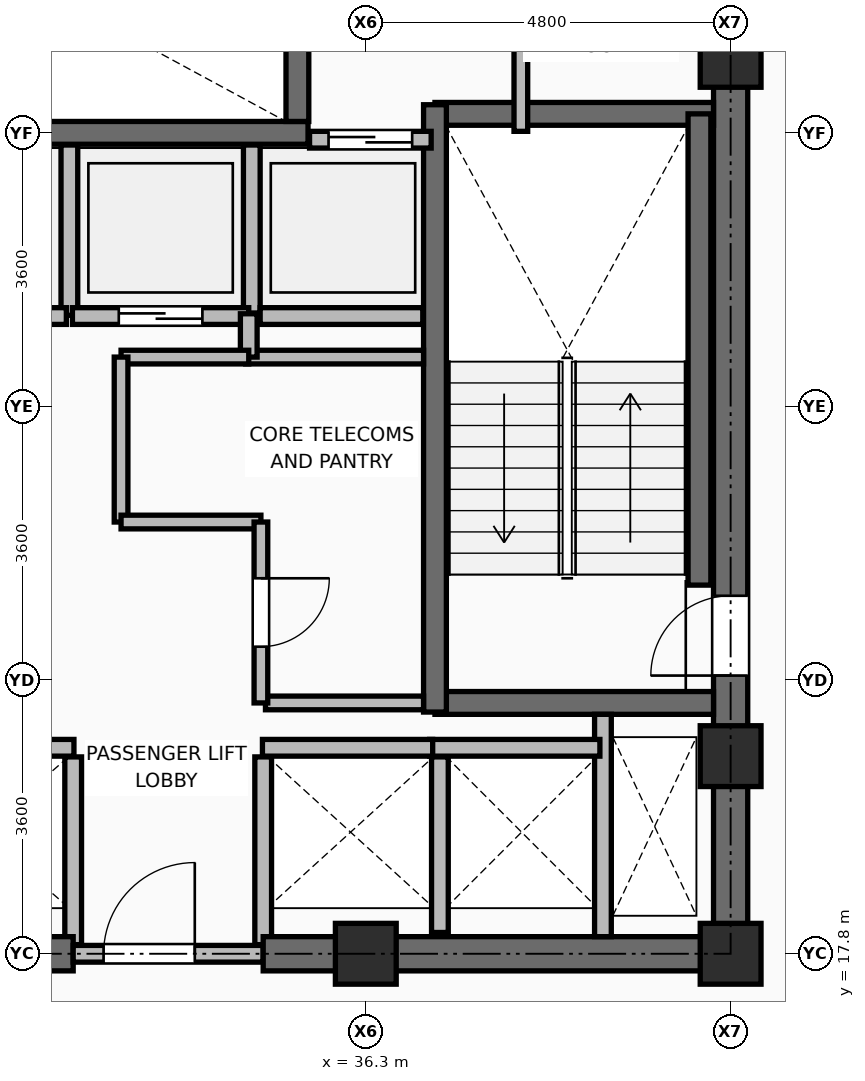
"""IFC4 building model, lengths in metres.
Left out: names, types, materials, properties, quantities, classifications, styles, units other than length and angle.
Written with IfcOpenShell. Run it as: python <this file> out.ifc"""

import sys

from ifc_helpers import new_model, si_unit, direction, frame, frame_2d, origin, origin_2d, place, context, subcontext, project, spatial, rectangle, extrude, element, fill, save


model = new_model("IFC4")
c1 = context("Model", 3, precision=1e-05, world=origin(), true_north=direction((0.0, 1.0)))
c2 = subcontext(c1, "Body", "Model", "MODEL_VIEW")
j1 = project(units=[si_unit("LENGTHUNIT", "METRE"), si_unit("PLANEANGLEUNIT", "RADIAN")], contexts=[c1])
p1 = place(None, origin())
s1 = spatial("IfcSite", under=j1, at=p1, CompositionType="ELEMENT")
p2 = place(p1, origin())
s2 = spatial("IfcBuilding", under=s1, at=p2, CompositionType="ELEMENT")
p3 = place(p2, frame((0.0, 0.0, 242.4)))
s3 = spatial("IfcBuildingStorey", under=s2, at=p3, CompositionType="ELEMENT", Elevation=242.4)
for number, where, z_axis, x_axis in (
    (1, (36.3, 17.8, 0.0), (0.0, 0.0, 1.0), (1.0, 0.0, 0.0)),
    (2, (41.1, 17.8, 0.0), (0.0, 0.0, 1.0), (1.0, 0.0, 0.0)),
    (3, (41.1, 20.4, 0.0), (0.0, 0.0, 1.0), (1.0, 0.0, 0.0)),
    (4, (41.1, 29.6, 0.0), (0.0, 0.0, 1.0), (1.0, 0.0, 0.0)),
):
    element("IfcColumn", number, at=place(p3, frame(where, z_axis=z_axis, x_axis=x_axis)), inside=s3, PredefinedType="COLUMN", context=c2, shape_type="SweptSolid", body=[
        extrude(rectangle(XDim=0.8, YDim=0.8, at=origin_2d()), origin(), (0.0, 0.0, 1.0), 3.75),
    ])
for number, where, z_axis, x_axis in (
    (5, (32.45, 17.92, 0.0), (0.0, 0.0, 1.0), (0.0, 1.0, 0.0)),
    (6, (34.95, 17.92, 0.0), (0.0, 0.0, 1.0), (0.0, 1.0, 0.0)),
):
    element("IfcWall", number, at=place(p3, frame(where, z_axis=z_axis, x_axis=x_axis)), inside=s3, PredefinedType="PARTITIONING", context=c2, shape_type="SweptSolid", body=[
        extrude(rectangle(XDim=2.47, YDim=0.22, at=frame_2d((1.235, 0.0))), origin(), (0.0, 0.0, 1.0), 3.545),
    ])
p4 = place(p3, frame((37.275, 18.08, 0.0), z_axis=(0.0, 0.0, 1.0), x_axis=(0.0, 1.0, 0.0)))
e7 = element("IfcWall", 7, at=p4, inside=s3, PredefinedType="PARTITIONING", context=c2, shape_type="SweptSolid", body=[
    extrude(rectangle(XDim=2.31, YDim=0.22, at=frame_2d((1.155, 0.0))), origin(), (0.0, 0.0, 1.0), 3.545),
])
p5 = place(p3, frame((32.4, 26.2, 0.0), z_axis=(0.0, 0.0, 1.0), x_axis=(0.0, 1.0, 0.0)))
e8 = element("IfcWall", 8, at=p5, inside=s3, PredefinedType="PARTITIONING", context=c2, shape_type="SweptSolid", body=[
    extrude(rectangle(XDim=2.24, YDim=0.22, at=frame_2d((1.12, 0.0))), origin(), (0.0, 0.0, 1.0), 3.545),
])
p6 = place(p3, frame((34.8, 26.23, 0.0), z_axis=(0.0, 0.0, 1.0), x_axis=(0.0, 1.0, 0.0)))
e9 = element("IfcWall", 9, at=p6, inside=s3, PredefinedType="PARTITIONING", context=c2, shape_type="SweptSolid", body=[
    extrude(rectangle(XDim=2.21, YDim=0.22, at=frame_2d((1.105, 0.0))), origin(), (0.0, 0.0, 1.0), 3.545),
])
p7 = place(p3, frame((34.91, 26.19, 0.0), z_axis=(0.0, 0.0, 1.0), x_axis=(1.0, 0.0, 0.0)))
e10 = element("IfcWall", 10, at=p7, inside=s3, PredefinedType="PARTITIONING", context=c2, shape_type="SweptSolid", body=[
    extrude(rectangle(XDim=2.14, YDim=0.22, at=frame_2d((1.07, 0.0))), origin(), (0.0, 0.0, 1.0), 3.545),
])
p8 = place(p3, frame((25.55, 17.8, 0.0), z_axis=(0.0, 0.0, 1.0), x_axis=(1.0, 0.0, 0.0)))
e11 = element("IfcWall", 11, at=p8, inside=s3, PredefinedType="SHEAR", context=c2, shape_type="SweptSolid", body=[
    extrude(rectangle(XDim=6.9, YDim=0.45, at=frame_2d((3.45, 0.0))), origin(), (0.0, 0.0, 1.0), 3.57),
])
p9 = place(p3, frame((32.45, 17.8, 0.0), z_axis=(0.0, 0.0, 1.0), x_axis=(1.0, 0.0, 0.0)))
e12 = element("IfcWall", 12, at=p9, inside=s3, PredefinedType="PARTITIONING", context=c2, shape_type="SweptSolid", body=[
    extrude(rectangle(XDim=2.5, YDim=0.22, at=frame_2d((1.25, 0.0))), origin(), (0.0, 0.0, 1.0), 3.081),
])
p10 = place(p9, frame((0.4, 0.0, 0.0)))
e13 = element("IfcOpeningElement", 13, at=p10, cuts=e12, PredefinedType="OPENING", context=c2, shape_type="SweptSolid", body=[
    extrude(rectangle(XDim=1.2, YDim=2.1, at=frame_2d((0.6, 1.05))), frame((0.0, 0.12, 0.0), z_axis=(0.0, -1.0, 0.0), x_axis=(1.0, 0.0, 0.0)), (0.0, 0.0, 1.0), 0.24),
])
p11 = place(p3, frame((34.95, 17.8, 0.0), z_axis=(0.0, 0.0, 1.0), x_axis=(1.0, 0.0, 0.0)))
e14 = element("IfcWall", 14, at=p11, inside=s3, PredefinedType="SHEAR", context=c2, shape_type="SweptSolid", body=[
    extrude(rectangle(XDim=6.375, YDim=0.45, at=frame_2d((3.188, 0.0))), origin(), (0.0, 0.0, 1.0), 3.57),
])
p12 = place(p3, frame((41.1, 18.025, 0.0), z_axis=(0.0, 0.0, 1.0), x_axis=(0.0, 1.0, 0.0)))
e15 = element("IfcWall", 15, at=p12, inside=s3, PredefinedType="SHEAR", context=c2, shape_type="SweptSolid", body=[
    extrude(rectangle(XDim=14.2, YDim=0.45, at=frame_2d((7.1, 0.0))), origin(), (0.0, 0.0, 1.0), 3.57),
])
p13 = place(p12, frame((3.435, 0.0, 0.0)))
e16 = element("IfcOpeningElement", 16, at=p13, cuts=e15, PredefinedType="OPENING", context=c2, shape_type="SweptSolid", body=[
    extrude(rectangle(XDim=1.05, YDim=2.1, at=frame_2d((0.525, 1.05))), frame((0.0, 0.235, 0.0), z_axis=(0.0, -1.0, 0.0), x_axis=(1.0, 0.0, 0.0)), (0.0, 0.0, 1.0), 0.47),
])
for number, where, z_axis, x_axis in (
    (17, (37.21, 21.1, 0.0), (0.0, 0.0, 1.0), (1.0, 0.0, 0.0)),
    (18, (37.21, 28.85, 0.0), (0.0, 0.0, 1.0), (1.0, 0.0, 0.0)),
):
    element("IfcWall", number, at=place(p3, frame(where, z_axis=z_axis, x_axis=x_axis)), inside=s3, PredefinedType="SHEAR", context=c2, shape_type="SweptSolid", body=[
        extrude(rectangle(XDim=3.665, YDim=0.3, at=frame_2d((1.833, 0.0))), origin(), (0.0, 0.0, 1.0), 3.57),
    ])
p14 = place(p3, frame((37.21, 20.98, 0.0), z_axis=(0.0, 0.0, 1.0), x_axis=(0.0, 1.0, 0.0)))
e19 = element("IfcWall", 19, at=p14, inside=s3, PredefinedType="SHEAR", context=c2, shape_type="SweptSolid", body=[
    extrude(rectangle(XDim=7.99, YDim=0.3, at=frame_2d((3.995, 0.0))), origin(), (0.0, 0.0, 1.0), 3.57),
])
p15 = place(p3, frame((40.69, 22.65, 0.0), z_axis=(0.0, 0.0, 1.0), x_axis=(0.0, 1.0, 0.0)))
e20 = element("IfcWall", 20, at=p15, inside=s3, PredefinedType="SHEAR", context=c2, shape_type="SweptSolid", body=[
    extrude(rectangle(XDim=6.2, YDim=0.3, at=frame_2d((3.1, 0.0))), origin(), (0.0, 0.0, 1.0), 3.57),
])
p16 = place(p3, frame((27.51, 28.6, 0.0), z_axis=(0.0, 0.0, 1.0), x_axis=(1.0, 0.0, 0.0)))
e21 = element("IfcWall", 21, at=p16, inside=s3, PredefinedType="SHEAR", context=c2, shape_type="SweptSolid", body=[
    extrude(rectangle(XDim=8.03, YDim=0.3, at=frame_2d((4.015, 0.0))), origin(), (0.0, 0.0, 1.0), 3.57),
])
p17 = place(p3, frame((35.4, 28.75, 0.0), z_axis=(0.0, 0.0, 1.0), x_axis=(0.0, 1.0, 0.0)))
e22 = element("IfcWall", 22, at=p17, inside=s3, PredefinedType="SHEAR", context=c2, shape_type="SweptSolid", body=[
    extrude(rectangle(XDim=3.475, YDim=0.3, at=frame_2d((1.738, 0.0))), origin(), (0.0, 0.0, 1.0), 3.57),
])
p18 = place(p3, frame((39.42, 18.025, 0.0), z_axis=(0.0, 0.0, 1.0), x_axis=(0.0, 1.0, 0.0)))
e23 = element("IfcWall", 23, at=p18, inside=s3, PredefinedType="PARTITIONING", context=c2, shape_type="SweptSolid", body=[
    extrude(rectangle(XDim=2.925, YDim=0.22, at=frame_2d((1.462, 0.0))), origin(), (0.0, 0.0, 1.0), 3.55),
])
p19 = place(p3, frame((30.04, 20.51, 0.0), z_axis=(0.0, 0.0, 1.0), x_axis=(1.0, 0.0, 0.0)))
e24 = element("IfcWall", 24, at=p19, inside=s3, PredefinedType="PARTITIONING", context=c2, shape_type="SweptSolid", body=[
    extrude(rectangle(XDim=2.42, YDim=0.22, at=frame_2d((1.21, 0.0))), origin(), (0.0, 0.0, 1.0), 3.55),
])
for number, where, z_axis, x_axis in (
    (25, (37.14, 20.51, 0.0), (0.0, 0.0, 1.0), (1.0, 0.0, 0.0)),
    (26, (34.94, 20.51, 0.0), (0.0, 0.0, 1.0), (1.0, 0.0, 0.0)),
):
    element("IfcWall", number, at=place(p3, frame(where, z_axis=z_axis, x_axis=x_axis)), inside=s3, PredefinedType="PARTITIONING", context=c2, shape_type="SweptSolid", body=[
        extrude(rectangle(XDim=2.24, YDim=0.22, at=frame_2d((1.12, 0.0))), origin(), (0.0, 0.0, 1.0), 3.55),
    ])
p20 = place(p3, frame((30.04, 26.19, 0.0), z_axis=(0.0, 0.0, 1.0), x_axis=(1.0, 0.0, 0.0)))
e27 = element("IfcWall", 27, at=p20, inside=s3, PredefinedType="PARTITIONING", context=c2, shape_type="SweptSolid", body=[
    extrude(rectangle(XDim=2.32, YDim=0.22, at=frame_2d((1.16, 0.0))), origin(), (0.0, 0.0, 1.0), 3.55),
])
p21 = place(p20, frame((0.61, 0.0, 0.0)))
e28 = element("IfcOpeningElement", 28, at=p21, cuts=e27, PredefinedType="OPENING", context=c2, shape_type="SweptSolid", body=[
    extrude(rectangle(XDim=1.1, YDim=2.2, at=frame_2d((0.55, 1.1))), frame((0.0, 0.12, 0.0), z_axis=(0.0, -1.0, 0.0), x_axis=(1.0, 0.0, 0.0)), (0.0, 0.0, 1.0), 0.24),
])
p22 = place(p3, frame((32.44, 26.19, 0.0), z_axis=(0.0, 0.0, 1.0), x_axis=(1.0, 0.0, 0.0)))
e29 = element("IfcWall", 29, at=p22, inside=s3, PredefinedType="PARTITIONING", context=c2, shape_type="SweptSolid", body=[
    extrude(rectangle(XDim=2.32, YDim=0.22, at=frame_2d((1.16, 0.0))), origin(), (0.0, 0.0, 1.0), 3.55),
])
p23 = place(p22, frame((0.61, 0.0, 0.0)))
e30 = element("IfcOpeningElement", 30, at=p23, cuts=e29, PredefinedType="OPENING", context=c2, shape_type="SweptSolid", body=[
    extrude(rectangle(XDim=1.1, YDim=2.2, at=frame_2d((0.55, 1.1))), frame((0.0, 0.12, 0.0), z_axis=(0.0, -1.0, 0.0), x_axis=(1.0, 0.0, 0.0)), (0.0, 0.0, 1.0), 0.24),
])
p24 = place(p3, frame((35.56, 28.51, 0.0), z_axis=(0.0, 0.0, 1.0), x_axis=(1.0, 0.0, 0.0)))
e31 = element("IfcWall", 31, at=p24, inside=s3, PredefinedType="PARTITIONING", context=c2, shape_type="SweptSolid", body=[
    extrude(rectangle(XDim=1.6, YDim=0.22, at=frame_2d((0.8, 0.0))), origin(), (0.0, 0.0, 1.0), 3.55),
])
p25 = place(p24, frame((0.25, 0.0, 0.0)))
e32 = element("IfcOpeningElement", 32, at=p25, cuts=e31, PredefinedType="OPENING", context=c2, shape_type="SweptSolid", body=[
    extrude(rectangle(XDim=1.1, YDim=2.2, at=frame_2d((0.55, 1.1))), frame((0.0, 0.12, 0.0), z_axis=(0.0, -1.0, 0.0), x_axis=(1.0, 0.0, 0.0)), (0.0, 0.0, 1.0), 0.24),
])
p26 = place(p3, frame((34.98, 21.1, 0.0), z_axis=(0.0, 0.0, 1.0), x_axis=(1.0, 0.0, 0.0)))
e33 = element("IfcWall", 33, at=p26, inside=s3, PredefinedType="PARTITIONING", context=c2, shape_type="SweptSolid", body=[
    extrude(rectangle(XDim=2.08, YDim=0.18, at=frame_2d((1.04, 0.0))), origin(), (0.0, 0.0, 1.0), 3.55),
])
p27 = place(p3, frame((34.72, 25.65, 0.0), z_axis=(0.0, 0.0, 1.0), x_axis=(1.0, 0.0, 0.0)))
e34 = element("IfcWall", 34, at=p27, inside=s3, PredefinedType="PARTITIONING", context=c2, shape_type="SweptSolid", body=[
    extrude(rectangle(XDim=2.34, YDim=0.18, at=frame_2d((1.17, 0.0))), origin(), (0.0, 0.0, 1.0), 3.55),
])
p28 = place(p3, frame((34.76, 25.65, 0.0), z_axis=(0.0, 0.0, 1.0), x_axis=(0.0, 1.0, 0.0)))
e35 = element("IfcWall", 35, at=p28, inside=s3, PredefinedType="PARTITIONING", context=c2, shape_type="SweptSolid", body=[
    extrude(rectangle(XDim=0.57, YDim=0.22, at=frame_2d((0.285, 0.0))), origin(), (0.0, 0.0, 1.0), 3.55),
])
p29 = place(p3, frame((33.08, 25.65, 0.0), z_axis=(0.0, 0.0, 1.0), x_axis=(1.0, 0.0, 0.0)))
e36 = element("IfcWall", 36, at=p29, inside=s3, PredefinedType="PARTITIONING", context=c2, shape_type="SweptSolid", body=[
    extrude(rectangle(XDim=1.68, YDim=0.18, at=frame_2d((0.84, 0.0))), origin(), (0.0, 0.0, 1.0), 3.55),
])
p30 = place(p3, frame((33.08, 23.48, 0.0), z_axis=(0.0, 0.0, 1.0), x_axis=(0.0, 1.0, 0.0)))
e37 = element("IfcWall", 37, at=p30, inside=s3, PredefinedType="PARTITIONING", context=c2, shape_type="SweptSolid", body=[
    extrude(rectangle(XDim=2.17, YDim=0.18, at=frame_2d((1.085, 0.0))), origin(), (0.0, 0.0, 1.0), 3.55),
])
p31 = place(p3, frame((33.08, 23.48, 0.0), z_axis=(0.0, 0.0, 1.0), x_axis=(1.0, 0.0, 0.0)))
e38 = element("IfcWall", 38, at=p31, inside=s3, PredefinedType="PARTITIONING", context=c2, shape_type="SweptSolid", body=[
    extrude(rectangle(XDim=1.84, YDim=0.18, at=frame_2d((0.92, 0.0))), origin(), (0.0, 0.0, 1.0), 3.55),
])
p32 = place(p3, frame((34.92, 21.1, 0.0), z_axis=(0.0, 0.0, 1.0), x_axis=(0.0, 1.0, 0.0)))
e39 = element("IfcWall", 39, at=p32, inside=s3, PredefinedType="PARTITIONING", context=c2, shape_type="SweptSolid", body=[
    extrude(rectangle(XDim=2.38, YDim=0.18, at=frame_2d((1.19, 0.0))), origin(), (0.0, 0.0, 1.0), 3.55),
])
p33 = place(p32, frame((0.74, 0.0, 0.0)))
e40 = element("IfcOpeningElement", 40, at=p33, cuts=e39, PredefinedType="OPENING", context=c2, shape_type="SweptSolid", body=[
    extrude(rectangle(XDim=0.9, YDim=2.1, at=frame_2d((0.45, 1.05))), frame((0.0, 0.1, 0.0), z_axis=(0.0, -1.0, 0.0), x_axis=(1.0, 0.0, 0.0)), (0.0, 0.0, 1.0), 0.2),
])
p34 = place(p3, frame((38.34, 28.62, 0.0), z_axis=(0.0, 0.0, 1.0), x_axis=(0.0, 1.0, 0.0)))
e41 = element("IfcWall", 41, at=p34, inside=s3, PredefinedType="PARTITIONING", context=c2, shape_type="SweptSolid", body=[
    extrude(rectangle(XDim=3.605, YDim=0.18, at=frame_2d((1.802, 0.0))), origin(), (0.0, 0.0, 1.0), 3.55),
])
p35 = place(p10, origin())
e42 = element("IfcDoor", 42, at=p35, inside=s3, OperationType="SINGLE_SWING_RIGHT", PredefinedType="DOOR", context=c2, shape_type="SweptSolid", body=[
    extrude(rectangle(XDim=1.2, YDim=2.1, at=frame_2d((0.6, 1.05))), frame((0.0, 0.025, 0.0), z_axis=(0.0, -1.0, 0.0), x_axis=(1.0, 0.0, 0.0)), (0.0, 0.0, 1.0), 0.05),
])
fill(e13, e42)
p36 = place(p13, origin())
e43 = element("IfcDoor", 43, at=p36, inside=s3, OperationType="SINGLE_SWING_LEFT", PredefinedType="DOOR", context=c2, shape_type="SweptSolid", body=[
    extrude(rectangle(XDim=1.05, YDim=2.1, at=frame_2d((0.525, 1.05))), frame((0.0, 0.025, 0.0), z_axis=(0.0, -1.0, 0.0), x_axis=(1.0, 0.0, 0.0)), (0.0, 0.0, 1.0), 0.05),
])
fill(e16, e43)
p37 = place(p23, frame((1.1, 0.0, 0.0), z_axis=(0.0, 0.0, 1.0), x_axis=(-1.0, 0.0, 0.0)))
e44 = element("IfcDoor", 44, at=p37, inside=s3, OperationType="DOUBLE_DOOR_SLIDING", PredefinedType="DOOR", context=c2, shape_type="SweptSolid", body=[
    extrude(rectangle(XDim=1.1, YDim=2.2, at=frame_2d((0.55, 1.1))), frame((0.0, 0.025, 0.0), z_axis=(0.0, -1.0, 0.0), x_axis=(1.0, 0.0, 0.0)), (0.0, 0.0, 1.0), 0.05),
])
fill(e30, e44)
p38 = place(p25, origin())
e45 = element("IfcDoor", 45, at=p38, inside=s3, OperationType="DOUBLE_DOOR_SLIDING", PredefinedType="DOOR", context=c2, shape_type="SweptSolid", body=[
    extrude(rectangle(XDim=1.1, YDim=2.2, at=frame_2d((0.55, 1.1))), frame((0.0, 0.025, 0.0), z_axis=(0.0, -1.0, 0.0), x_axis=(1.0, 0.0, 0.0)), (0.0, 0.0, 1.0), 0.05),
])
fill(e32, e45)
p39 = place(p33, frame((0.9, 0.0, 0.0), z_axis=(0.0, 0.0, 1.0), x_axis=(-1.0, 0.0, 0.0)))
e46 = element("IfcDoor", 46, at=p39, inside=s3, OperationType="SINGLE_SWING_LEFT", PredefinedType="DOOR", context=c2, shape_type="SweptSolid", body=[
    extrude(rectangle(XDim=0.9, YDim=2.1, at=frame_2d((0.45, 1.05))), frame((0.0, 0.025, 0.0), z_axis=(0.0, -1.0, 0.0), x_axis=(1.0, 0.0, 0.0)), (0.0, 0.0, 1.0), 0.05),
])
fill(e40, e46)
save(model, sys.argv[1])
